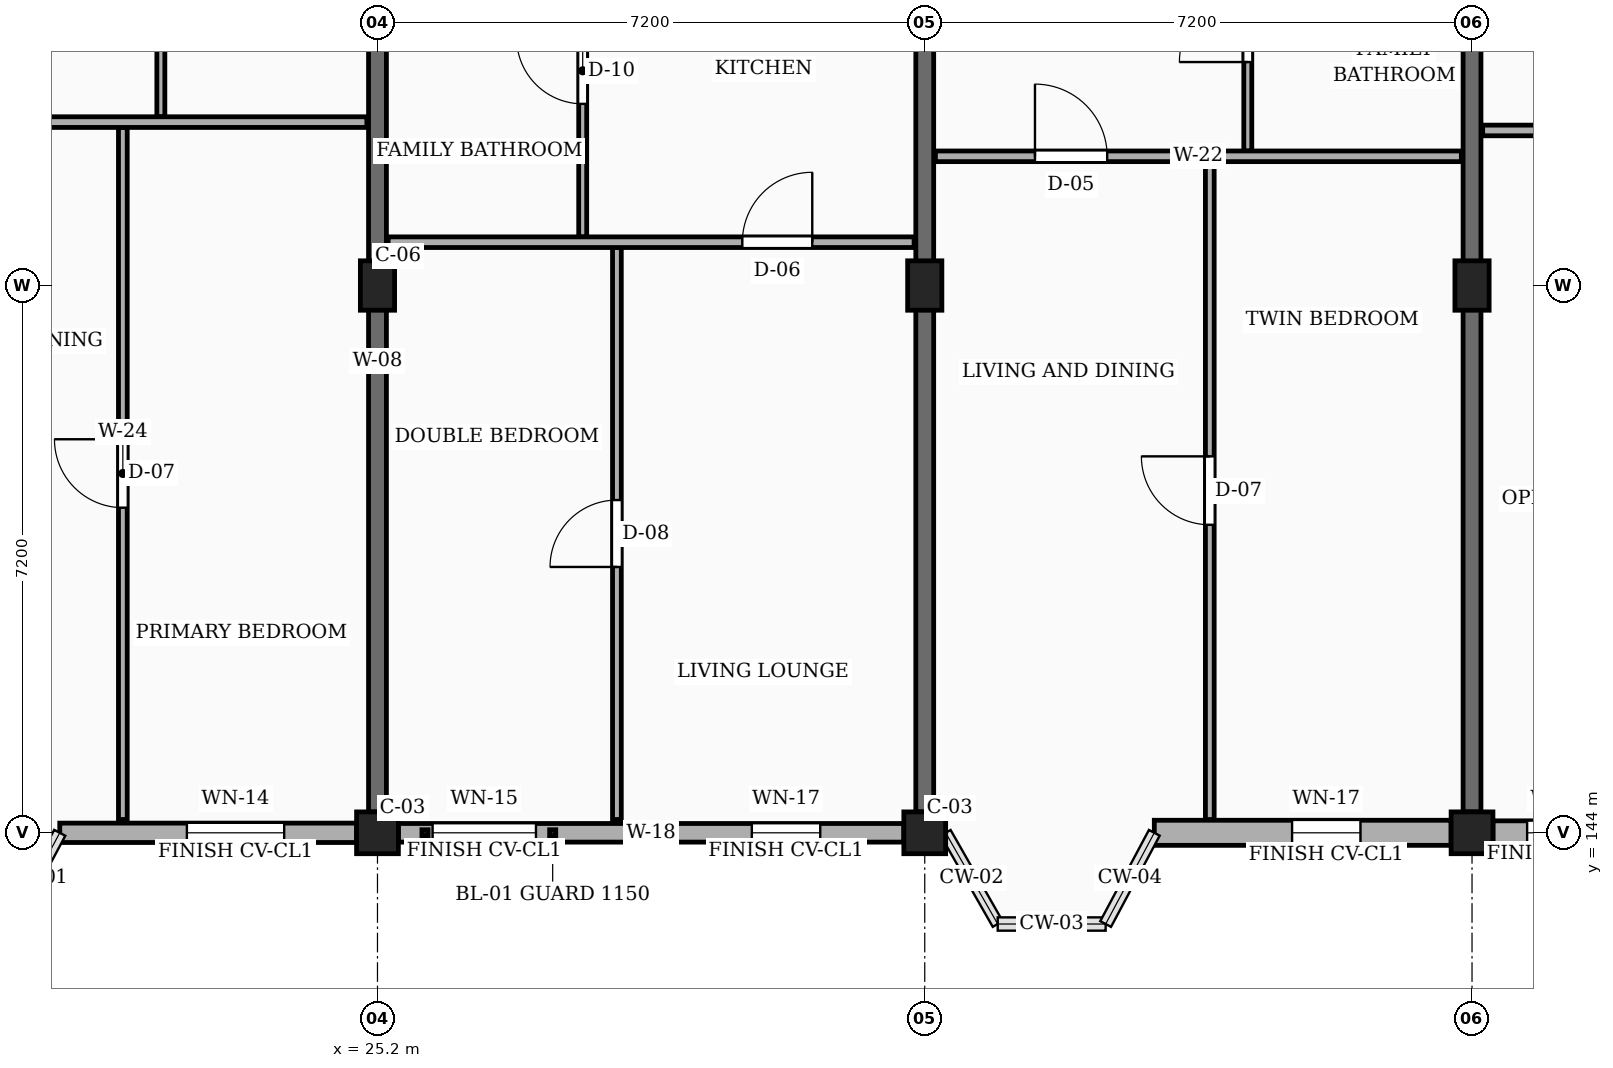
"""IFC4 building model, lengths in metres.
Left out: names, types, materials, properties, quantities, classifications, styles, units other than length and angle.
Written with IfcOpenShell. Run it as: python <this file> out.ifc"""

import sys

from ifc_helpers import new_model, si_unit, direction, frame, frame_2d, origin, origin_2d, place, context, subcontext, project, spatial, rectangle, extrude, element, fill, save


model = new_model("IFC4")
c1 = context("Model", 3, precision=1e-05, world=origin(), true_north=direction((0.0, 1.0)))
c2 = subcontext(c1, "Body", "Model", "MODEL_VIEW")
j1 = project(units=[si_unit("LENGTHUNIT", "METRE"), si_unit("PLANEANGLEUNIT", "RADIAN")], contexts=[c1])
p1 = place(None, origin())
s1 = spatial("IfcSite", under=j1, at=p1, CompositionType="ELEMENT")
p2 = place(p1, origin())
s2 = spatial("IfcBuilding", under=s1, at=p2, CompositionType="ELEMENT")
p3 = place(p2, frame((0.0, 0.0, 13.95)))
s3 = spatial("IfcBuildingStorey", under=s2, at=p3, CompositionType="ELEMENT", Elevation=13.95)
p4 = place(p3, frame((25.2, 144.0, 0.0), z_axis=(0.0, 0.0, 1.0), x_axis=(1.0, 0.0, 0.0)))
e1 = element("IfcColumn", 1, at=p4, inside=s3, PredefinedType="COLUMN", context=c2, shape_type="SweptSolid", body=[
    extrude(rectangle(XDim=0.55, YDim=0.55, at=origin_2d()), origin(), (0.0, 0.0, 1.0), 3.15),
])
p5 = place(p3, frame((25.2, 151.2, 0.0), z_axis=(0.0, 0.0, 1.0), x_axis=(1.0, 0.0, 0.0)))
e2 = element("IfcColumn", 2, at=p5, inside=s3, PredefinedType="COLUMN", context=c2, shape_type="SweptSolid", body=[
    extrude(rectangle(XDim=0.45, YDim=0.65, at=origin_2d()), origin(), (0.0, 0.0, 1.0), 3.15),
])
p6 = place(p3, frame((32.4, 144.0, 0.0), z_axis=(0.0, 0.0, 1.0), x_axis=(1.0, 0.0, 0.0)))
e3 = element("IfcColumn", 3, at=p6, inside=s3, PredefinedType="COLUMN", context=c2, shape_type="SweptSolid", body=[
    extrude(rectangle(XDim=0.55, YDim=0.55, at=origin_2d()), origin(), (0.0, 0.0, 1.0), 3.15),
])
p7 = place(p3, frame((32.4, 151.2, 0.0), z_axis=(0.0, 0.0, 1.0), x_axis=(1.0, 0.0, 0.0)))
e4 = element("IfcColumn", 4, at=p7, inside=s3, PredefinedType="COLUMN", context=c2, shape_type="SweptSolid", body=[
    extrude(rectangle(XDim=0.45, YDim=0.65, at=origin_2d()), origin(), (0.0, 0.0, 1.0), 3.15),
])
p8 = place(p3, frame((39.6, 144.0, 0.0), z_axis=(0.0, 0.0, 1.0), x_axis=(1.0, 0.0, 0.0)))
e5 = element("IfcColumn", 5, at=p8, inside=s3, PredefinedType="COLUMN", context=c2, shape_type="SweptSolid", body=[
    extrude(rectangle(XDim=0.55, YDim=0.55, at=origin_2d()), origin(), (0.0, 0.0, 1.0), 3.15),
])
p9 = place(p3, frame((39.6, 151.2, 0.0), z_axis=(0.0, 0.0, 1.0), x_axis=(1.0, 0.0, 0.0)))
e6 = element("IfcColumn", 6, at=p9, inside=s3, PredefinedType="COLUMN", context=c2, shape_type="SweptSolid", body=[
    extrude(rectangle(XDim=0.45, YDim=0.65, at=origin_2d()), origin(), (0.0, 0.0, 1.0), 3.15),
])
for number, where, z_axis, x_axis in (
    (7, (25.2, 144.275, 0.0), (0.0, 0.0, 1.0), (0.0, 1.0, 0.0)),
    (8, (32.4, 144.275, 0.0), (0.0, 0.0, 1.0), (0.0, 1.0, 0.0)),
    (9, (39.6, 144.275, 0.0), (0.0, 0.0, 1.0), (0.0, 1.0, 0.0)),
):
    element("IfcWall", number, at=place(p3, frame(where, z_axis=z_axis, x_axis=x_axis)), inside=s3, PredefinedType="SOLIDWALL", context=c2, shape_type="SweptSolid", body=[
        extrude(rectangle(XDim=11.875, YDim=0.235, at=frame_2d((5.938, 0.0))), origin(), (0.0, 0.0, 1.0), 2.185),
    ])
p10 = place(p3, frame((21.02, 144.0, 0.0), z_axis=(0.0, 0.0, 1.0), x_axis=(1.0, 0.0, 0.0)))
e10 = element("IfcWall", 10, at=p10, inside=s3, PredefinedType="SOLIDWALL", context=c2, shape_type="SweptSolid", body=[
    extrude(rectangle(XDim=3.905, YDim=0.255, at=frame_2d((1.953, 0.0))), origin(), (0.0, 0.0, 1.0), 2.455),
])
p11 = place(p10, frame((1.673, 0.0, 0.78)))
e11 = element("IfcOpeningElement", 11, at=p11, cuts=e10, PredefinedType="OPENING", context=c2, shape_type="SweptSolid", body=[
    extrude(rectangle(XDim=1.28, YDim=1.26, at=frame_2d((0.64, 0.63))), frame((0.0, 0.137, 0.0), z_axis=(0.0, -1.0, 0.0), x_axis=(1.0, 0.0, 0.0)), (0.0, 0.0, 1.0), 0.275),
])
p12 = place(p3, frame((25.475, 144.0, 0.0), z_axis=(0.0, 0.0, 1.0), x_axis=(1.0, 0.0, 0.0)))
e12 = element("IfcWall", 12, at=p12, inside=s3, PredefinedType="SOLIDWALL", context=c2, shape_type="SweptSolid", body=[
    extrude(rectangle(XDim=6.65, YDim=0.245, at=frame_2d((3.325, 0.0))), origin(), (0.0, 0.0, 1.0), 2.455),
])
p13 = place(p12, frame((0.45, 0.0, 0.78)))
e13 = element("IfcOpeningElement", 13, at=p13, cuts=e12, PredefinedType="OPENING", context=c2, shape_type="SweptSolid", body=[
    extrude(rectangle(XDim=1.36, YDim=1.26, at=frame_2d((0.68, 0.63))), frame((0.0, 0.133, 0.0), z_axis=(0.0, -1.0, 0.0), x_axis=(1.0, 0.0, 0.0)), (0.0, 0.0, 1.0), 0.265),
])
p14 = place(p12, frame((4.65, 0.0, 0.78)))
e14 = element("IfcOpeningElement", 14, at=p14, cuts=e12, PredefinedType="OPENING", context=c2, shape_type="SweptSolid", body=[
    extrude(rectangle(XDim=0.9, YDim=1.36, at=frame_2d((0.45, 0.68))), frame((0.0, 0.133, 0.0), z_axis=(0.0, -1.0, 0.0), x_axis=(1.0, 0.0, 0.0)), (0.0, 0.0, 1.0), 0.265),
])
p15 = place(p3, frame((35.42, 144.0, 0.0), z_axis=(0.0, 0.0, 1.0), x_axis=(1.0, 0.0, 0.0)))
e15 = element("IfcWall", 15, at=p15, inside=s3, PredefinedType="SOLIDWALL", context=c2, shape_type="SweptSolid", body=[
    extrude(rectangle(XDim=3.905, YDim=0.33, at=frame_2d((1.953, 0.0))), origin(), (0.0, 0.0, 1.0), 2.455),
])
p16 = place(p15, frame((1.812, 0.0, 0.78)))
e16 = element("IfcOpeningElement", 16, at=p16, cuts=e15, PredefinedType="OPENING", context=c2, shape_type="SweptSolid", body=[
    extrude(rectangle(XDim=0.9, YDim=1.36, at=frame_2d((0.45, 0.68))), frame((0.0, 0.175, 0.0), z_axis=(0.0, -1.0, 0.0), x_axis=(1.0, 0.0, 0.0)), (0.0, 0.0, 1.0), 0.35),
])
p17 = place(p3, frame((39.875, 144.0, 0.0), z_axis=(0.0, 0.0, 1.0), x_axis=(1.0, 0.0, 0.0)))
e17 = element("IfcWall", 17, at=p17, inside=s3, PredefinedType="SOLIDWALL", context=c2, shape_type="SweptSolid", body=[
    extrude(rectangle(XDim=6.65, YDim=0.315, at=frame_2d((3.325, 0.0))), origin(), (0.0, 0.0, 1.0), 2.455),
])
p18 = place(p17, frame((0.45, 0.0, 0.78)))
e18 = element("IfcOpeningElement", 18, at=p18, cuts=e17, PredefinedType="OPENING", context=c2, shape_type="SweptSolid", body=[
    extrude(rectangle(XDim=0.98, YDim=1.36, at=frame_2d((0.49, 0.68))), frame((0.0, 0.167, 0.0), z_axis=(0.0, -1.0, 0.0), x_axis=(1.0, 0.0, 0.0)), (0.0, 0.0, 1.0), 0.335),
])
p19 = place(p17, frame((4.65, 0.0, 0.78)))
e19 = element("IfcOpeningElement", 19, at=p19, cuts=e17, PredefinedType="OPENING", context=c2, shape_type="SweptSolid", body=[
    extrude(rectangle(XDim=1.14, YDim=1.36, at=frame_2d((0.57, 0.68))), frame((0.0, 0.167, 0.0), z_axis=(0.0, -1.0, 0.0), x_axis=(1.0, 0.0, 0.0)), (0.0, 0.0, 1.0), 0.335),
])
p20 = place(p3, frame((21.85, 144.175, 0.0), z_axis=(0.0, 0.0, 1.0), x_axis=(0.0, 1.0, 0.0)))
e20 = element("IfcWall", 20, at=p20, inside=s3, PredefinedType="PARTITIONING", context=c2, shape_type="SweptSolid", body=[
    extrude(rectangle(XDim=9.105, YDim=0.115, at=frame_2d((4.552, 0.0))), origin(), (0.0, 0.0, 1.0), 2.32),
])
p21 = place(p20, frame((4.103, 0.0, 0.0)))
e21 = element("IfcOpeningElement", 21, at=p21, cuts=e20, PredefinedType="OPENING", context=c2, shape_type="SweptSolid", body=[
    extrude(rectangle(XDim=0.9, YDim=2.1, at=frame_2d((0.45, 1.05))), frame((0.0, 0.067, 0.0), z_axis=(0.0, -1.0, 0.0), x_axis=(1.0, 0.0, 0.0)), (0.0, 0.0, 1.0), 0.135),
])
p22 = place(p3, frame((22.35, 153.42, 0.0), z_axis=(0.0, 0.0, 1.0), x_axis=(0.0, 1.0, 0.0)))
e22 = element("IfcWall", 22, at=p22, inside=s3, PredefinedType="PARTITIONING", context=c2, shape_type="SweptSolid", body=[
    extrude(rectangle(XDim=2.79, YDim=0.105, at=frame_2d((1.395, 0.0))), origin(), (0.0, 0.0, 1.0), 2.32),
])
p23 = place(p22, frame((0.945, 0.0, 0.0)))
e23 = element("IfcOpeningElement", 23, at=p23, cuts=e22, PredefinedType="OPENING", context=c2, shape_type="SweptSolid", body=[
    extrude(rectangle(XDim=0.9, YDim=2.05, at=frame_2d((0.45, 1.025))), frame((0.0, 0.062, 0.0), z_axis=(0.0, -1.0, 0.0), x_axis=(1.0, 0.0, 0.0)), (0.0, 0.0, 1.0), 0.125),
])
p24 = place(p3, frame((18.14, 153.35, 0.0), z_axis=(0.0, 0.0, 1.0), x_axis=(1.0, 0.0, 0.0)))
e24 = element("IfcWall", 24, at=p24, inside=s3, PredefinedType="PARTITIONING", context=c2, shape_type="SweptSolid", body=[
    extrude(rectangle(XDim=6.92, YDim=0.14, at=frame_2d((3.46, 0.0))), origin(), (0.0, 0.0, 1.0), 2.32),
])
p25 = place(p24, frame((1.31, 0.0, 0.0)))
e25 = element("IfcOpeningElement", 25, at=p25, cuts=e24, PredefinedType="OPENING", context=c2, shape_type="SweptSolid", body=[
    extrude(rectangle(XDim=0.95, YDim=2.1, at=frame_2d((0.475, 1.05))), frame((0.0, 0.08, 0.0), z_axis=(0.0, -1.0, 0.0), x_axis=(1.0, 0.0, 0.0)), (0.0, 0.0, 1.0), 0.16),
])
p26 = place(p3, frame((28.35, 144.175, 0.0), z_axis=(0.0, 0.0, 1.0), x_axis=(0.0, 1.0, 0.0)))
e26 = element("IfcWall", 26, at=p26, inside=s3, PredefinedType="PARTITIONING", context=c2, shape_type="SweptSolid", body=[
    extrude(rectangle(XDim=7.525, YDim=0.115, at=frame_2d((3.762, 0.0))), origin(), (0.0, 0.0, 1.0), 2.32),
])
p27 = place(p26, frame((3.323, 0.0, 0.0)))
e27 = element("IfcOpeningElement", 27, at=p27, cuts=e26, PredefinedType="OPENING", context=c2, shape_type="SweptSolid", body=[
    extrude(rectangle(XDim=0.88, YDim=2.08, at=frame_2d((0.44, 1.04))), frame((0.0, 0.067, 0.0), z_axis=(0.0, -1.0, 0.0), x_axis=(1.0, 0.0, 0.0)), (0.0, 0.0, 1.0), 0.135),
])
p28 = place(p3, frame((27.9, 151.84, 0.0), z_axis=(0.0, 0.0, 1.0), x_axis=(0.0, 1.0, 0.0)))
e28 = element("IfcWall", 28, at=p28, inside=s3, PredefinedType="PARTITIONING", context=c2, shape_type="SweptSolid", body=[
    extrude(rectangle(XDim=4.37, YDim=0.105, at=frame_2d((2.185, 0.0))), origin(), (0.0, 0.0, 1.0), 2.32),
])
p29 = place(p28, frame((1.75, 0.0, 0.0)))
e29 = element("IfcOpeningElement", 29, at=p29, cuts=e28, PredefinedType="OPENING", context=c2, shape_type="SweptSolid", body=[
    extrude(rectangle(XDim=0.87, YDim=2.05, at=frame_2d((0.435, 1.025))), frame((0.0, 0.062, 0.0), z_axis=(0.0, -1.0, 0.0), x_axis=(1.0, 0.0, 0.0)), (0.0, 0.0, 1.0), 0.125),
])
p30 = place(p3, frame((25.34, 151.77, 0.0), z_axis=(0.0, 0.0, 1.0), x_axis=(1.0, 0.0, 0.0)))
e30 = element("IfcWall", 30, at=p30, inside=s3, PredefinedType="PARTITIONING", context=c2, shape_type="SweptSolid", body=[
    extrude(rectangle(XDim=6.92, YDim=0.14, at=frame_2d((3.46, 0.0))), origin(), (0.0, 0.0, 1.0), 2.32),
])
p31 = place(p30, frame((4.66, 0.0, 0.0)))
e31 = element("IfcOpeningElement", 31, at=p31, cuts=e30, PredefinedType="OPENING", context=c2, shape_type="SweptSolid", body=[
    extrude(rectangle(XDim=0.92, YDim=2.1, at=frame_2d((0.46, 1.05))), frame((0.0, 0.08, 0.0), z_axis=(0.0, -1.0, 0.0), x_axis=(1.0, 0.0, 0.0)), (0.0, 0.0, 1.0), 0.16),
])
p32 = place(p3, frame((36.15, 144.175, 0.0), z_axis=(0.0, 0.0, 1.0), x_axis=(0.0, 1.0, 0.0)))
e32 = element("IfcWall", 32, at=p32, inside=s3, PredefinedType="PARTITIONING", context=c2, shape_type="SweptSolid", body=[
    extrude(rectangle(XDim=8.655, YDim=0.115, at=frame_2d((4.328, 0.0))), origin(), (0.0, 0.0, 1.0), 2.32),
])
p33 = place(p32, frame((3.877, 0.0, 0.0)))
e33 = element("IfcOpeningElement", 33, at=p33, cuts=e32, PredefinedType="OPENING", context=c2, shape_type="SweptSolid", body=[
    extrude(rectangle(XDim=0.9, YDim=2.1, at=frame_2d((0.45, 1.05))), frame((0.0, 0.067, 0.0), z_axis=(0.0, -1.0, 0.0), x_axis=(1.0, 0.0, 0.0)), (0.0, 0.0, 1.0), 0.135),
])
p34 = place(p3, frame((36.65, 152.97, 0.0), z_axis=(0.0, 0.0, 1.0), x_axis=(0.0, 1.0, 0.0)))
e34 = element("IfcWall", 34, at=p34, inside=s3, PredefinedType="PARTITIONING", context=c2, shape_type="SweptSolid", body=[
    extrude(rectangle(XDim=3.24, YDim=0.105, at=frame_2d((1.62, 0.0))), origin(), (0.0, 0.0, 1.0), 2.32),
])
p35 = place(p34, frame((1.17, 0.0, 0.0)))
e35 = element("IfcOpeningElement", 35, at=p35, cuts=e34, PredefinedType="OPENING", context=c2, shape_type="SweptSolid", body=[
    extrude(rectangle(XDim=0.9, YDim=2.05, at=frame_2d((0.45, 1.025))), frame((0.0, 0.062, 0.0), z_axis=(0.0, -1.0, 0.0), x_axis=(1.0, 0.0, 0.0)), (0.0, 0.0, 1.0), 0.125),
])
p36 = place(p3, frame((32.54, 152.9, 0.0), z_axis=(0.0, 0.0, 1.0), x_axis=(1.0, 0.0, 0.0)))
e36 = element("IfcWall", 36, at=p36, inside=s3, PredefinedType="PARTITIONING", context=c2, shape_type="SweptSolid", body=[
    extrude(rectangle(XDim=6.92, YDim=0.14, at=frame_2d((3.46, 0.0))), origin(), (0.0, 0.0, 1.0), 2.32),
])
p37 = place(p36, frame((1.31, 0.0, 0.0)))
e37 = element("IfcOpeningElement", 37, at=p37, cuts=e36, PredefinedType="OPENING", context=c2, shape_type="SweptSolid", body=[
    extrude(rectangle(XDim=0.95, YDim=2.1, at=frame_2d((0.475, 1.05))), frame((0.0, 0.08, 0.0), z_axis=(0.0, -1.0, 0.0), x_axis=(1.0, 0.0, 0.0)), (0.0, 0.0, 1.0), 0.16),
])
p38 = place(p3, frame((39.74, 153.24, 0.0), z_axis=(0.0, 0.0, 1.0), x_axis=(1.0, 0.0, 0.0)))
e38 = element("IfcWall", 38, at=p38, inside=s3, PredefinedType="PARTITIONING", context=c2, shape_type="SweptSolid", body=[
    extrude(rectangle(XDim=6.92, YDim=0.14, at=frame_2d((3.46, 0.0))), origin(), (0.0, 0.0, 1.0), 2.32),
])
p39 = place(p38, frame((1.31, 0.0, 0.0)))
e39 = element("IfcOpeningElement", 39, at=p39, cuts=e38, PredefinedType="OPENING", context=c2, shape_type="SweptSolid", body=[
    extrude(rectangle(XDim=0.92, YDim=2.1, at=frame_2d((0.46, 1.05))), frame((0.0, 0.08, 0.0), z_axis=(0.0, -1.0, 0.0), x_axis=(1.0, 0.0, 0.0)), (0.0, 0.0, 1.0), 0.16),
])
p40 = place(p11, origin())
e40 = element("IfcWindow", 40, at=p40, inside=s3, PartitioningType="SINGLE_PANEL", PredefinedType="WINDOW", context=c2, shape_type="SweptSolid", body=[
    extrude(rectangle(XDim=1.28, YDim=1.26, at=frame_2d((0.64, 0.63))), frame((0.0, 0.03, 0.0), z_axis=(0.0, -1.0, 0.0), x_axis=(1.0, 0.0, 0.0)), (0.0, 0.0, 1.0), 0.06),
])
fill(e11, e40)
p41 = place(p13, origin())
e41 = element("IfcWindow", 41, at=p41, inside=s3, PartitioningType="SINGLE_PANEL", PredefinedType="WINDOW", context=c2, shape_type="SweptSolid", body=[
    extrude(rectangle(XDim=1.36, YDim=1.26, at=frame_2d((0.68, 0.63))), frame((0.0, 0.03, 0.0), z_axis=(0.0, -1.0, 0.0), x_axis=(1.0, 0.0, 0.0)), (0.0, 0.0, 1.0), 0.06),
])
fill(e13, e41)
p42 = place(p14, origin())
e42 = element("IfcWindow", 42, at=p42, inside=s3, PartitioningType="SINGLE_PANEL", PredefinedType="WINDOW", context=c2, shape_type="SweptSolid", body=[
    extrude(rectangle(XDim=0.9, YDim=1.36, at=frame_2d((0.45, 0.68))), frame((0.0, 0.03, 0.0), z_axis=(0.0, -1.0, 0.0), x_axis=(1.0, 0.0, 0.0)), (0.0, 0.0, 1.0), 0.06),
])
fill(e14, e42)
p43 = place(p16, origin())
e43 = element("IfcWindow", 43, at=p43, inside=s3, PartitioningType="SINGLE_PANEL", PredefinedType="WINDOW", context=c2, shape_type="SweptSolid", body=[
    extrude(rectangle(XDim=0.9, YDim=1.36, at=frame_2d((0.45, 0.68))), frame((0.0, 0.03, 0.0), z_axis=(0.0, -1.0, 0.0), x_axis=(1.0, 0.0, 0.0)), (0.0, 0.0, 1.0), 0.06),
])
fill(e16, e43)
p44 = place(p18, origin())
e44 = element("IfcWindow", 44, at=p44, inside=s3, PartitioningType="SINGLE_PANEL", PredefinedType="WINDOW", context=c2, shape_type="SweptSolid", body=[
    extrude(rectangle(XDim=0.98, YDim=1.36, at=frame_2d((0.49, 0.68))), frame((0.0, 0.03, 0.0), z_axis=(0.0, -1.0, 0.0), x_axis=(1.0, 0.0, 0.0)), (0.0, 0.0, 1.0), 0.06),
])
fill(e18, e44)
p45 = place(p21, origin())
e45 = element("IfcDoor", 45, at=p45, inside=s3, OperationType="SINGLE_SWING_RIGHT", PredefinedType="DOOR", context=c2, shape_type="SweptSolid", body=[
    extrude(rectangle(XDim=0.9, YDim=2.1, at=frame_2d((0.45, 1.05))), frame((0.0, 0.025, 0.0), z_axis=(0.0, -1.0, 0.0), x_axis=(1.0, 0.0, 0.0)), (0.0, 0.0, 1.0), 0.05),
])
fill(e21, e45)
p46 = place(p27, origin())
e46 = element("IfcDoor", 46, at=p46, inside=s3, OperationType="SINGLE_SWING_LEFT", PredefinedType="DOOR", context=c2, shape_type="SweptSolid", body=[
    extrude(rectangle(XDim=0.88, YDim=2.08, at=frame_2d((0.44, 1.04))), frame((0.0, 0.025, 0.0), z_axis=(0.0, -1.0, 0.0), x_axis=(1.0, 0.0, 0.0)), (0.0, 0.0, 1.0), 0.05),
])
fill(e27, e46)
p47 = place(p29, origin())
e47 = element("IfcDoor", 47, at=p47, inside=s3, OperationType="SINGLE_SWING_RIGHT", PredefinedType="DOOR", context=c2, shape_type="SweptSolid", body=[
    extrude(rectangle(XDim=0.87, YDim=2.05, at=frame_2d((0.435, 1.025))), frame((0.0, 0.025, 0.0), z_axis=(0.0, -1.0, 0.0), x_axis=(1.0, 0.0, 0.0)), (0.0, 0.0, 1.0), 0.05),
])
fill(e29, e47)
p48 = place(p31, origin())
e48 = element("IfcDoor", 48, at=p48, inside=s3, OperationType="SINGLE_SWING_RIGHT", PredefinedType="DOOR", context=c2, shape_type="SweptSolid", body=[
    extrude(rectangle(XDim=0.92, YDim=2.1, at=frame_2d((0.46, 1.05))), frame((0.0, 0.025, 0.0), z_axis=(0.0, -1.0, 0.0), x_axis=(1.0, 0.0, 0.0)), (0.0, 0.0, 1.0), 0.05),
])
fill(e31, e48)
p49 = place(p33, origin())
e49 = element("IfcDoor", 49, at=p49, inside=s3, OperationType="SINGLE_SWING_RIGHT", PredefinedType="DOOR", context=c2, shape_type="SweptSolid", body=[
    extrude(rectangle(XDim=0.9, YDim=2.1, at=frame_2d((0.45, 1.05))), frame((0.0, 0.025, 0.0), z_axis=(0.0, -1.0, 0.0), x_axis=(1.0, 0.0, 0.0)), (0.0, 0.0, 1.0), 0.05),
])
fill(e33, e49)
p50 = place(p35, origin())
e50 = element("IfcDoor", 50, at=p50, inside=s3, OperationType="SINGLE_SWING_LEFT", PredefinedType="DOOR", context=c2, shape_type="SweptSolid", body=[
    extrude(rectangle(XDim=0.9, YDim=2.05, at=frame_2d((0.45, 1.025))), frame((0.0, 0.025, 0.0), z_axis=(0.0, -1.0, 0.0), x_axis=(1.0, 0.0, 0.0)), (0.0, 0.0, 1.0), 0.05),
])
fill(e35, e50)
p51 = place(p37, origin())
e51 = element("IfcDoor", 51, at=p51, inside=s3, OperationType="SINGLE_SWING_LEFT", PredefinedType="DOOR", context=c2, shape_type="SweptSolid", body=[
    extrude(rectangle(XDim=0.95, YDim=2.1, at=frame_2d((0.475, 1.05))), frame((0.0, 0.025, 0.0), z_axis=(0.0, -1.0, 0.0), x_axis=(1.0, 0.0, 0.0)), (0.0, 0.0, 1.0), 0.05),
])
fill(e37, e51)
save(model, sys.argv[1])
